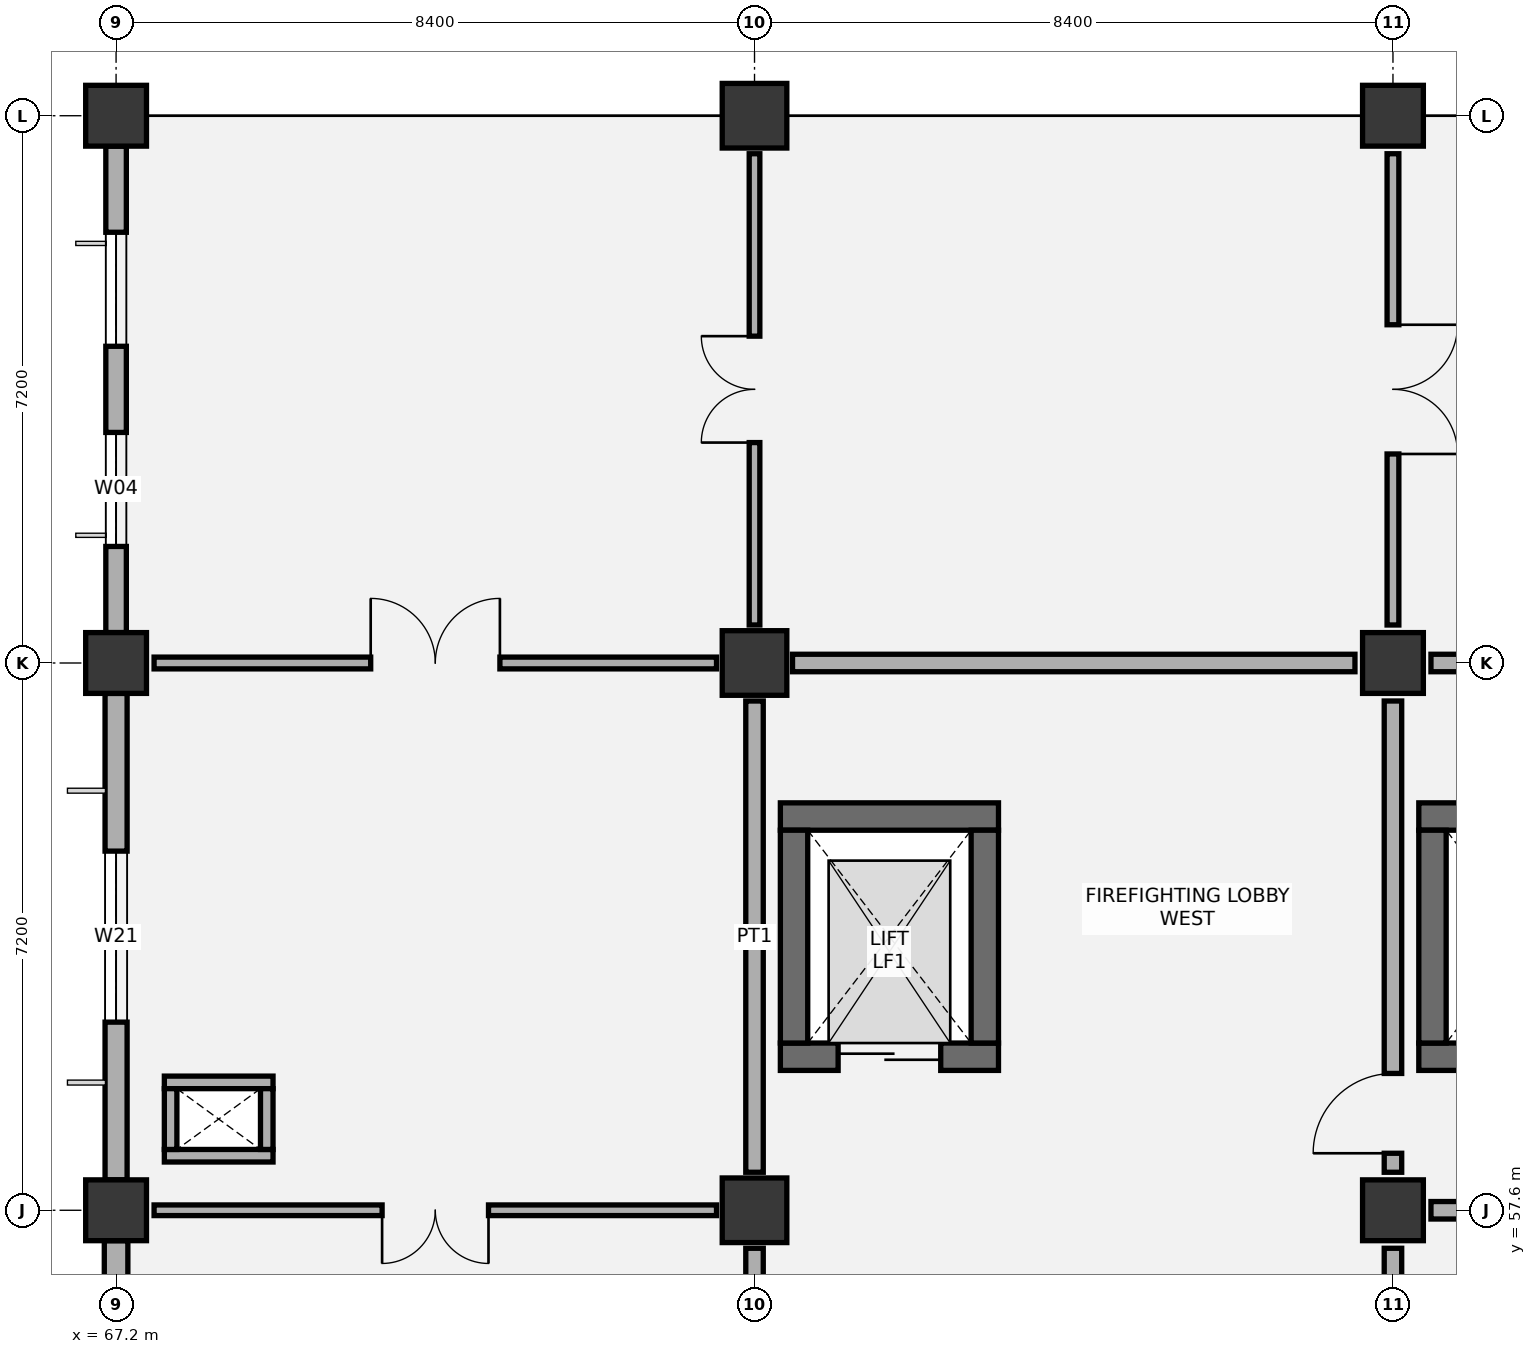
"""IFC4 building model, lengths in metres.
Left out: names, types, materials, properties, quantities, classifications, styles, units other than length and angle.
Written with IfcOpenShell. Run it as: python <this file> out.ifc"""

import sys

from ifc_helpers import new_model, si_unit, direction, frame, frame_2d, origin, origin_2d, place, context, subcontext, project, spatial, rectangle, extrude, element, fill, save


model = new_model("IFC4")
c1 = context("Model", 3, precision=1e-05, world=origin(), true_north=direction((0.0, 1.0)))
c2 = subcontext(c1, "Body", "Model", "MODEL_VIEW")
j1 = project(units=[si_unit("LENGTHUNIT", "METRE"), si_unit("PLANEANGLEUNIT", "RADIAN")], contexts=[c1])
p1 = place(None, origin())
s1 = spatial("IfcSite", under=j1, at=p1, CompositionType="ELEMENT")
p2 = place(p1, origin())
s2 = spatial("IfcBuilding", under=s1, at=p2, CompositionType="ELEMENT")
p3 = place(p2, frame((0.0, 0.0, 22.2)))
s3 = spatial("IfcBuildingStorey", under=s2, at=p3, CompositionType="ELEMENT", Elevation=22.2)
for number, where, z_axis, x_axis in (
    (1, (67.2, 57.6, 0.0), (0.0, 0.0, 1.0), (1.0, 0.0, 0.0)),
    (2, (67.2, 64.8, 0.0), (0.0, 0.0, 1.0), (1.0, 0.0, 0.0)),
    (3, (67.2, 72.0, 0.0), (0.0, 0.0, 1.0), (1.0, 0.0, 0.0)),
):
    element("IfcColumn", number, at=place(p3, frame(where, z_axis=z_axis, x_axis=x_axis)), inside=s3, PredefinedType="COLUMN", context=c2, shape_type="SweptSolid", body=[
        extrude(rectangle(XDim=0.8, YDim=0.8, at=origin_2d()), origin(), (0.0, 0.0, 1.0), 4.8),
    ])
for number, where, z_axis, x_axis in (
    (4, (75.6, 57.6, 0.0), (0.0, 0.0, 1.0), (1.0, 0.0, 0.0)),
    (5, (75.6, 64.8, 0.0), (0.0, 0.0, 1.0), (1.0, 0.0, 0.0)),
    (6, (75.6, 72.0, 0.0), (0.0, 0.0, 1.0), (1.0, 0.0, 0.0)),
):
    element("IfcColumn", number, at=place(p3, frame(where, z_axis=z_axis, x_axis=x_axis)), inside=s3, PredefinedType="COLUMN", context=c2, shape_type="SweptSolid", body=[
        extrude(rectangle(XDim=0.85, YDim=0.85, at=origin_2d()), origin(), (0.0, 0.0, 1.0), 4.8),
    ])
for number, where, z_axis, x_axis in (
    (7, (84.0, 57.6, 0.0), (0.0, 0.0, 1.0), (1.0, 0.0, 0.0)),
    (8, (84.0, 64.8, 0.0), (0.0, 0.0, 1.0), (1.0, 0.0, 0.0)),
    (9, (84.0, 72.0, 0.0), (0.0, 0.0, 1.0), (1.0, 0.0, 0.0)),
):
    element("IfcColumn", number, at=place(p3, frame(where, z_axis=z_axis, x_axis=x_axis)), inside=s3, PredefinedType="COLUMN", context=c2, shape_type="SweptSolid", body=[
        extrude(rectangle(XDim=0.8, YDim=0.8, at=origin_2d()), origin(), (0.0, 0.0, 1.0), 4.8),
    ])
p4 = place(p3, frame((75.94, 62.78, 0.0), z_axis=(0.0, 0.0, 1.0), x_axis=(1.0, 0.0, 0.0)))
e10 = element("IfcWall", 10, at=p4, inside=s3, PredefinedType="SHEAR", context=c2, shape_type="SweptSolid", body=[
    extrude(rectangle(XDim=2.87, YDim=0.36, at=frame_2d((1.435, 0.0))), origin(), (0.0, 0.0, 1.0), 4.52),
])
p5 = place(p3, frame((75.94, 59.62, 0.0), z_axis=(0.0, 0.0, 1.0), x_axis=(1.0, 0.0, 0.0)))
e11 = element("IfcWall", 11, at=p5, inside=s3, PredefinedType="SHEAR", context=c2, shape_type="SweptSolid", body=[
    extrude(rectangle(XDim=2.87, YDim=0.36, at=frame_2d((1.435, 0.0))), origin(), (0.0, 0.0, 1.0), 4.52),
])
p6 = place(p5, frame((0.76, 0.0, 0.0)))
e12 = element("IfcOpeningElement", 12, at=p6, cuts=e11, PredefinedType="OPENING", context=c2, shape_type="SweptSolid", body=[
    extrude(rectangle(XDim=1.35, YDim=2.2, at=frame_2d((0.675, 1.1))), frame((0.0, 0.19, 0.0), z_axis=(0.0, -1.0, 0.0), x_axis=(1.0, 0.0, 0.0)), (0.0, 0.0, 1.0), 0.38),
])
for number, where, z_axis, x_axis in (
    (13, (76.12, 59.8, 0.0), (0.0, 0.0, 1.0), (0.0, 1.0, 0.0)),
    (14, (78.63, 59.8, 0.0), (0.0, 0.0, 1.0), (0.0, 1.0, 0.0)),
):
    element("IfcWall", number, at=place(p3, frame(where, z_axis=z_axis, x_axis=x_axis)), inside=s3, PredefinedType="SHEAR", context=c2, shape_type="SweptSolid", body=[
        extrude(rectangle(XDim=2.8, YDim=0.36, at=frame_2d((1.4, 0.0))), origin(), (0.0, 0.0, 1.0), 4.52),
    ])
p7 = place(p3, frame((84.34, 62.78, 0.0), z_axis=(0.0, 0.0, 1.0), x_axis=(1.0, 0.0, 0.0)))
e15 = element("IfcWall", 15, at=p7, inside=s3, PredefinedType="SHEAR", context=c2, shape_type="SweptSolid", body=[
    extrude(rectangle(XDim=7.77, YDim=0.36, at=frame_2d((3.885, 0.0))), origin(), (0.0, 0.0, 1.0), 4.52),
])
p8 = place(p3, frame((84.34, 59.62, 0.0), z_axis=(0.0, 0.0, 1.0), x_axis=(1.0, 0.0, 0.0)))
e16 = element("IfcWall", 16, at=p8, inside=s3, PredefinedType="SHEAR", context=c2, shape_type="SweptSolid", body=[
    extrude(rectangle(XDim=2.66, YDim=0.36, at=frame_2d((1.33, 0.0))), origin(), (0.0, 0.0, 1.0), 4.52),
])
p9 = place(p8, frame((0.78, 0.0, 0.0)))
e17 = element("IfcOpeningElement", 17, at=p9, cuts=e16, PredefinedType="OPENING", context=c2, shape_type="SweptSolid", body=[
    extrude(rectangle(XDim=1.1, YDim=2.15, at=frame_2d((0.55, 1.075))), frame((0.0, 0.19, 0.0), z_axis=(0.0, -1.0, 0.0), x_axis=(1.0, 0.0, 0.0)), (0.0, 0.0, 1.0), 0.38),
])
p10 = place(p3, frame((84.52, 59.8, 0.0), z_axis=(0.0, 0.0, 1.0), x_axis=(0.0, 1.0, 0.0)))
e18 = element("IfcWall", 18, at=p10, inside=s3, PredefinedType="SHEAR", context=c2, shape_type="SweptSolid", body=[
    extrude(rectangle(XDim=2.8, YDim=0.36, at=frame_2d((1.4, 0.0))), origin(), (0.0, 0.0, 1.0), 4.52),
])
p11 = place(p3, frame((67.2, 50.8, 0.0), z_axis=(0.0, 0.0, 1.0), x_axis=(0.0, 1.0, 0.0)))
e19 = element("IfcWall", 19, at=p11, inside=s3, PredefinedType="SOLIDWALL", context=c2, shape_type="SweptSolid", body=[
    extrude(rectangle(XDim=6.4, YDim=0.31, at=frame_2d((3.2, 0.0))), origin(), (0.0, 0.0, 1.0), 3.865),
])
p12 = place(p11, frame((2.15, 0.0, 0.9)))
e20 = element("IfcOpeningElement", 20, at=p12, cuts=e19, PredefinedType="OPENING", context=c2, shape_type="SweptSolid", body=[
    extrude(rectangle(XDim=2.1, YDim=1.8, at=frame_2d((1.05, 0.9))), frame((0.0, 0.165, 0.0), z_axis=(0.0, -1.0, 0.0), x_axis=(1.0, 0.0, 0.0)), (0.0, 0.0, 1.0), 0.33),
])
p13 = place(p3, frame((67.2, 58.0, 0.0), z_axis=(0.0, 0.0, 1.0), x_axis=(0.0, 1.0, 0.0)))
e21 = element("IfcWall", 21, at=p13, inside=s3, PredefinedType="SOLIDWALL", context=c2, shape_type="SweptSolid", body=[
    extrude(rectangle(XDim=6.4, YDim=0.29, at=frame_2d((3.2, 0.0))), origin(), (0.0, 0.0, 1.0), 3.865),
])
p14 = place(p13, frame((2.075, 0.0, 0.9)))
e22 = element("IfcOpeningElement", 22, at=p14, cuts=e21, PredefinedType="OPENING", context=c2, shape_type="SweptSolid", body=[
    extrude(rectangle(XDim=2.25, YDim=1.95, at=frame_2d((1.125, 0.975))), frame((0.0, 0.155, 0.0), z_axis=(0.0, -1.0, 0.0), x_axis=(1.0, 0.0, 0.0)), (0.0, 0.0, 1.0), 0.31),
])
p15 = place(p3, frame((67.2, 65.2, 0.0), z_axis=(0.0, 0.0, 1.0), x_axis=(0.0, 1.0, 0.0)))
e23 = element("IfcWall", 23, at=p15, inside=s3, PredefinedType="SOLIDWALL", context=c2, shape_type="SweptSolid", body=[
    extrude(rectangle(XDim=6.4, YDim=0.27, at=frame_2d((3.2, 0.0))), origin(), (0.0, 0.0, 1.0), 3.865),
])
p16 = place(p15, frame((1.133, 0.0, 0.9)))
e24 = element("IfcOpeningElement", 24, at=p16, cuts=e23, PredefinedType="OPENING", context=c2, shape_type="SweptSolid", body=[
    extrude(rectangle(XDim=1.5, YDim=1.8, at=frame_2d((0.75, 0.9))), frame((0.0, 0.145, 0.0), z_axis=(0.0, -1.0, 0.0), x_axis=(1.0, 0.0, 0.0)), (0.0, 0.0, 1.0), 0.29),
])
p17 = place(p15, frame((3.767, 0.0, 0.9)))
e25 = element("IfcOpeningElement", 25, at=p17, cuts=e23, PredefinedType="OPENING", context=c2, shape_type="SweptSolid", body=[
    extrude(rectangle(XDim=1.5, YDim=1.8, at=frame_2d((0.75, 0.9))), frame((0.0, 0.145, 0.0), z_axis=(0.0, -1.0, 0.0), x_axis=(1.0, 0.0, 0.0)), (0.0, 0.0, 1.0), 0.29),
])
p18 = place(p3, frame((58.92, 72.0, -0.35), z_axis=(0.0, 0.0, 1.0), x_axis=(1.0, 0.0, 0.0)))
e26 = element("IfcWall", 26, at=p18, inside=s3, PredefinedType="PARAPET", context=c2, shape_type="SweptSolid", body=[
    extrude(rectangle(XDim=8.16, YDim=0.22, at=frame_2d((4.08, 0.0))), origin(), (0.0, 0.0, 1.0), 1.15),
])
for number, where, z_axis, x_axis in (
    (27, (67.835, 58.317, 0.0), (0.0, 0.0, 1.0), (1.0, 0.0, 0.0)),
    (28, (67.835, 59.282, 0.0), (0.0, 0.0, 1.0), (1.0, 0.0, 0.0)),
):
    element("IfcWall", number, at=place(p3, frame(where, z_axis=z_axis, x_axis=x_axis)), inside=s3, PredefinedType="PARTITIONING", context=c2, shape_type="SweptSolid", body=[
        extrude(rectangle(XDim=1.43, YDim=0.165, at=frame_2d((0.715, 0.0))), origin(), (0.0, 0.0, 1.0), 4.52),
    ])
for number, where, z_axis, x_axis in (
    (29, (67.917, 58.4, 0.0), (0.0, 0.0, 1.0), (0.0, 1.0, 0.0)),
    (30, (69.183, 58.4, 0.0), (0.0, 0.0, 1.0), (0.0, 1.0, 0.0)),
):
    element("IfcWall", number, at=place(p3, frame(where, z_axis=z_axis, x_axis=x_axis)), inside=s3, PredefinedType="PARTITIONING", context=c2, shape_type="SweptSolid", body=[
        extrude(rectangle(XDim=0.8, YDim=0.165, at=frame_2d((0.4, 0.0))), origin(), (0.0, 0.0, 1.0), 4.52),
    ])
p19 = place(p3, frame((75.6, 50.9, 0.0), z_axis=(0.0, 0.0, 1.0), x_axis=(0.0, 1.0, 0.0)))
e31 = element("IfcWall", 31, at=p19, inside=s3, PredefinedType="PARTITIONING", context=c2, shape_type="SweptSolid", body=[
    extrude(rectangle(XDim=6.2, YDim=0.23, at=frame_2d((3.1, 0.0))), origin(), (0.0, 0.0, 1.0), 4.225),
])
p20 = place(p19, frame((0.05, 0.0, 0.0)))
e32 = element("IfcOpeningElement", 32, at=p20, cuts=e31, PredefinedType="OPENING", context=c2, shape_type="SweptSolid", body=[
    extrude(rectangle(XDim=1.05, YDim=2.15, at=frame_2d((0.525, 1.075))), frame((0.0, 0.125, 0.0), z_axis=(0.0, -1.0, 0.0), x_axis=(1.0, 0.0, 0.0)), (0.0, 0.0, 1.0), 0.25),
])
p21 = place(p3, frame((67.7, 57.6, 0.0), z_axis=(0.0, 0.0, 1.0), x_axis=(1.0, 0.0, 0.0)))
e33 = element("IfcWall", 33, at=p21, inside=s3, PredefinedType="PARTITIONING", context=c2, shape_type="SweptSolid", body=[
    extrude(rectangle(XDim=7.4, YDim=0.14, at=frame_2d((3.7, 0.0))), origin(), (0.0, 0.0, 1.0), 3.815),
])
p22 = place(p21, frame((3.0, 0.0, 0.0)))
e34 = element("IfcOpeningElement", 34, at=p22, cuts=e33, PredefinedType="OPENING", context=c2, shape_type="SweptSolid", body=[
    extrude(rectangle(XDim=1.4, YDim=2.15, at=frame_2d((0.7, 1.075))), frame((0.0, 0.08, 0.0), z_axis=(0.0, -1.0, 0.0), x_axis=(1.0, 0.0, 0.0)), (0.0, 0.0, 1.0), 0.16),
])
p23 = place(p3, frame((75.6, 58.1, 0.0), z_axis=(0.0, 0.0, 1.0), x_axis=(0.0, 1.0, 0.0)))
e35 = element("IfcWall", 35, at=p23, inside=s3, PredefinedType="PARTITIONING", context=c2, shape_type="SweptSolid", body=[
    extrude(rectangle(XDim=6.2, YDim=0.23, at=frame_2d((3.1, 0.0))), origin(), (0.0, 0.0, 1.0), 3.865),
])
p24 = place(p3, frame((67.7, 64.8, 0.0), z_axis=(0.0, 0.0, 1.0), x_axis=(1.0, 0.0, 0.0)))
e36 = element("IfcWall", 36, at=p24, inside=s3, PredefinedType="PARTITIONING", context=c2, shape_type="SweptSolid", body=[
    extrude(rectangle(XDim=7.4, YDim=0.155, at=frame_2d((3.7, 0.0))), origin(), (0.0, 0.0, 1.0), 3.815),
])
p25 = place(p24, frame((2.85, 0.0, 0.0)))
e37 = element("IfcOpeningElement", 37, at=p25, cuts=e36, PredefinedType="OPENING", context=c2, shape_type="SweptSolid", body=[
    extrude(rectangle(XDim=1.7, YDim=2.25, at=frame_2d((0.85, 1.125))), frame((0.0, 0.087, 0.0), z_axis=(0.0, -1.0, 0.0), x_axis=(1.0, 0.0, 0.0)), (0.0, 0.0, 1.0), 0.175),
])
p26 = place(p3, frame((75.6, 65.3, 0.0), z_axis=(0.0, 0.0, 1.0), x_axis=(0.0, 1.0, 0.0)))
e38 = element("IfcWall", 38, at=p26, inside=s3, PredefinedType="PARTITIONING", context=c2, shape_type="SweptSolid", body=[
    extrude(rectangle(XDim=6.2, YDim=0.14, at=frame_2d((3.1, 0.0))), origin(), (0.0, 0.0, 1.0), 4.015),
])
p27 = place(p26, frame((2.4, 0.0, 0.0)))
e39 = element("IfcOpeningElement", 39, at=p27, cuts=e38, PredefinedType="OPENING", context=c2, shape_type="SweptSolid", body=[
    extrude(rectangle(XDim=1.4, YDim=2.15, at=frame_2d((0.7, 1.075))), frame((0.0, 0.08, 0.0), z_axis=(0.0, -1.0, 0.0), x_axis=(1.0, 0.0, 0.0)), (0.0, 0.0, 1.0), 0.16),
])
p28 = place(p3, frame((84.0, 50.9, 0.0), z_axis=(0.0, 0.0, 1.0), x_axis=(0.0, 1.0, 0.0)))
e40 = element("IfcWall", 40, at=p28, inside=s3, PredefinedType="PARTITIONING", context=c2, shape_type="SweptSolid", body=[
    extrude(rectangle(XDim=6.2, YDim=0.23, at=frame_2d((3.1, 0.0))), origin(), (0.0, 0.0, 1.0), 3.865),
])
p29 = place(p28, frame((0.05, 0.0, 0.0)))
e41 = element("IfcOpeningElement", 41, at=p29, cuts=e40, PredefinedType="OPENING", context=c2, shape_type="SweptSolid", body=[
    extrude(rectangle(XDim=1.05, YDim=2.15, at=frame_2d((0.525, 1.075))), frame((0.0, 0.125, 0.0), z_axis=(0.0, -1.0, 0.0), x_axis=(1.0, 0.0, 0.0)), (0.0, 0.0, 1.0), 0.25),
])
p30 = place(p3, frame((84.0, 58.1, 0.0), z_axis=(0.0, 0.0, 1.0), x_axis=(0.0, 1.0, 0.0)))
e42 = element("IfcWall", 42, at=p30, inside=s3, PredefinedType="PARTITIONING", context=c2, shape_type="SweptSolid", body=[
    extrude(rectangle(XDim=6.2, YDim=0.23, at=frame_2d((3.1, 0.0))), origin(), (0.0, 0.0, 1.0), 4.015),
])
p31 = place(p30, frame((0.25, 0.0, 0.0)))
e43 = element("IfcOpeningElement", 43, at=p31, cuts=e42, PredefinedType="OPENING", context=c2, shape_type="SweptSolid", body=[
    extrude(rectangle(XDim=1.05, YDim=2.15, at=frame_2d((0.525, 1.075))), frame((0.0, 0.125, 0.0), z_axis=(0.0, -1.0, 0.0), x_axis=(1.0, 0.0, 0.0)), (0.0, 0.0, 1.0), 0.25),
])
p32 = place(p3, frame((76.1, 64.8, 0.0), z_axis=(0.0, 0.0, 1.0), x_axis=(1.0, 0.0, 0.0)))
e44 = element("IfcWall", 44, at=p32, inside=s3, PredefinedType="PARTITIONING", context=c2, shape_type="SweptSolid", body=[
    extrude(rectangle(XDim=7.4, YDim=0.23, at=frame_2d((3.7, 0.0))), origin(), (0.0, 0.0, 1.0), 3.815),
])
p33 = place(p3, frame((84.0, 65.3, 0.0), z_axis=(0.0, 0.0, 1.0), x_axis=(0.0, 1.0, 0.0)))
e45 = element("IfcWall", 45, at=p33, inside=s3, PredefinedType="PARTITIONING", context=c2, shape_type="SweptSolid", body=[
    extrude(rectangle(XDim=6.2, YDim=0.155, at=frame_2d((3.1, 0.0))), origin(), (0.0, 0.0, 1.0), 3.865),
])
p34 = place(p33, frame((2.25, 0.0, 0.0)))
e46 = element("IfcOpeningElement", 46, at=p34, cuts=e45, PredefinedType="OPENING", context=c2, shape_type="SweptSolid", body=[
    extrude(rectangle(XDim=1.7, YDim=2.25, at=frame_2d((0.85, 1.125))), frame((0.0, 0.087, 0.0), z_axis=(0.0, -1.0, 0.0), x_axis=(1.0, 0.0, 0.0)), (0.0, 0.0, 1.0), 0.175),
])
p35 = place(p3, frame((84.5, 57.6, 0.0), z_axis=(0.0, 0.0, 1.0), x_axis=(1.0, 0.0, 0.0)))
e47 = element("IfcWall", 47, at=p35, inside=s3, PredefinedType="PARTITIONING", context=c2, shape_type="SweptSolid", body=[
    extrude(rectangle(XDim=7.4, YDim=0.23, at=frame_2d((3.7, 0.0))), origin(), (0.0, 0.0, 1.0), 3.815),
])
p36 = place(p35, frame((2.95, 0.0, 0.0)))
e48 = element("IfcOpeningElement", 48, at=p36, cuts=e47, PredefinedType="OPENING", context=c2, shape_type="SweptSolid", body=[
    extrude(rectangle(XDim=1.5, YDim=2.15, at=frame_2d((0.75, 1.075))), frame((0.0, 0.125, 0.0), z_axis=(0.0, -1.0, 0.0), x_axis=(1.0, 0.0, 0.0)), (0.0, 0.0, 1.0), 0.25),
])
p37 = place(p3, frame((84.5, 64.8, 0.0), z_axis=(0.0, 0.0, 1.0), x_axis=(1.0, 0.0, 0.0)))
e49 = element("IfcWall", 49, at=p37, inside=s3, PredefinedType="PARTITIONING", context=c2, shape_type="SweptSolid", body=[
    extrude(rectangle(XDim=7.4, YDim=0.23, at=frame_2d((3.7, 0.0))), origin(), (0.0, 0.0, 1.0), 3.815),
])
p38 = place(p14, origin())
e50 = element("IfcWindow", 50, at=p38, inside=s3, PartitioningType="SINGLE_PANEL", PredefinedType="WINDOW", context=c2, shape_type="SweptSolid", body=[
    extrude(rectangle(XDim=2.25, YDim=1.95, at=frame_2d((1.125, 0.975))), frame((0.0, 0.03, 0.0), z_axis=(0.0, -1.0, 0.0), x_axis=(1.0, 0.0, 0.0)), (0.0, 0.0, 1.0), 0.06),
])
fill(e22, e50)
p39 = place(p16, origin())
e51 = element("IfcWindow", 51, at=p39, inside=s3, PartitioningType="SINGLE_PANEL", PredefinedType="WINDOW", context=c2, shape_type="SweptSolid", body=[
    extrude(rectangle(XDim=1.5, YDim=1.8, at=frame_2d((0.75, 0.9))), frame((0.0, 0.03, 0.0), z_axis=(0.0, -1.0, 0.0), x_axis=(1.0, 0.0, 0.0)), (0.0, 0.0, 1.0), 0.06),
])
fill(e24, e51)
p40 = place(p17, origin())
e52 = element("IfcWindow", 52, at=p40, inside=s3, PartitioningType="SINGLE_PANEL", PredefinedType="WINDOW", context=c2, shape_type="SweptSolid", body=[
    extrude(rectangle(XDim=1.5, YDim=1.8, at=frame_2d((0.75, 0.9))), frame((0.0, 0.03, 0.0), z_axis=(0.0, -1.0, 0.0), x_axis=(1.0, 0.0, 0.0)), (0.0, 0.0, 1.0), 0.06),
])
fill(e25, e52)
p41 = place(p6, origin())
e53 = element("IfcDoor", 53, at=p41, inside=s3, OperationType="DOUBLE_DOOR_SLIDING", PredefinedType="DOOR", context=c2, shape_type="SweptSolid", body=[
    extrude(rectangle(XDim=1.35, YDim=2.2, at=frame_2d((0.675, 1.1))), frame((0.0, 0.025, 0.0), z_axis=(0.0, -1.0, 0.0), x_axis=(1.0, 0.0, 0.0)), (0.0, 0.0, 1.0), 0.05),
])
fill(e12, e53)
p42 = place(p22, frame((1.4, 0.0, 0.0), z_axis=(0.0, 0.0, 1.0), x_axis=(-1.0, 0.0, 0.0)))
e54 = element("IfcDoor", 54, at=p42, inside=s3, OperationType="DOUBLE_DOOR_SINGLE_SWING", PredefinedType="DOOR", context=c2, shape_type="SweptSolid", body=[
    extrude(rectangle(XDim=1.4, YDim=2.15, at=frame_2d((0.7, 1.075))), frame((0.0, 0.025, 0.0), z_axis=(0.0, -1.0, 0.0), x_axis=(1.0, 0.0, 0.0)), (0.0, 0.0, 1.0), 0.05),
])
fill(e34, e54)
p43 = place(p25, origin())
e55 = element("IfcDoor", 55, at=p43, inside=s3, OperationType="DOUBLE_DOOR_SINGLE_SWING", PredefinedType="DOOR", context=c2, shape_type="SweptSolid", body=[
    extrude(rectangle(XDim=1.7, YDim=2.25, at=frame_2d((0.85, 1.125))), frame((0.0, 0.025, 0.0), z_axis=(0.0, -1.0, 0.0), x_axis=(1.0, 0.0, 0.0)), (0.0, 0.0, 1.0), 0.05),
])
fill(e37, e55)
p44 = place(p27, origin())
e56 = element("IfcDoor", 56, at=p44, inside=s3, OperationType="DOUBLE_DOOR_SINGLE_SWING", PredefinedType="DOOR", context=c2, shape_type="SweptSolid", body=[
    extrude(rectangle(XDim=1.4, YDim=2.15, at=frame_2d((0.7, 1.075))), frame((0.0, 0.025, 0.0), z_axis=(0.0, -1.0, 0.0), x_axis=(1.0, 0.0, 0.0)), (0.0, 0.0, 1.0), 0.05),
])
fill(e39, e56)
p45 = place(p31, origin())
e57 = element("IfcDoor", 57, at=p45, inside=s3, OperationType="SINGLE_SWING_LEFT", PredefinedType="DOOR", context=c2, shape_type="SweptSolid", body=[
    extrude(rectangle(XDim=1.05, YDim=2.15, at=frame_2d((0.525, 1.075))), frame((0.0, 0.025, 0.0), z_axis=(0.0, -1.0, 0.0), x_axis=(1.0, 0.0, 0.0)), (0.0, 0.0, 1.0), 0.05),
])
fill(e43, e57)
p46 = place(p34, frame((1.7, 0.0, 0.0), z_axis=(0.0, 0.0, 1.0), x_axis=(-1.0, 0.0, 0.0)))
e58 = element("IfcDoor", 58, at=p46, inside=s3, OperationType="DOUBLE_DOOR_SINGLE_SWING", PredefinedType="DOOR", context=c2, shape_type="SweptSolid", body=[
    extrude(rectangle(XDim=1.7, YDim=2.25, at=frame_2d((0.85, 1.125))), frame((0.0, 0.025, 0.0), z_axis=(0.0, -1.0, 0.0), x_axis=(1.0, 0.0, 0.0)), (0.0, 0.0, 1.0), 0.05),
])
fill(e46, e58)
save(model, sys.argv[1])
